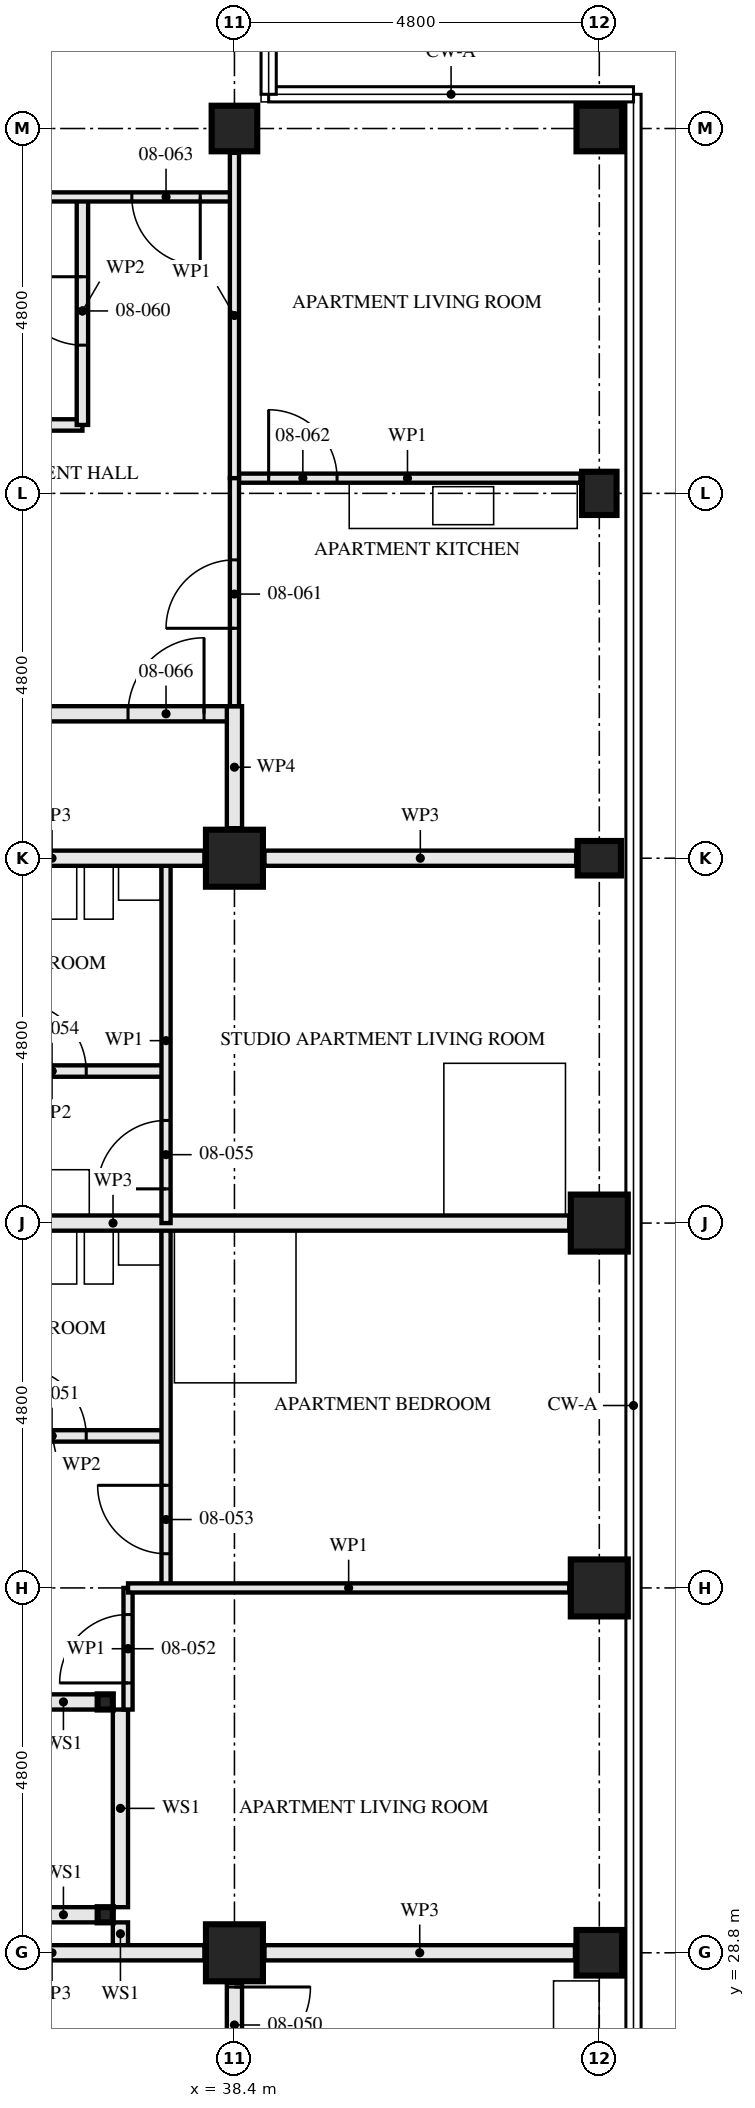
"""IFC4 building model, lengths in metres.
Left out: names, types, materials, properties, quantities, classifications, styles, units other than length and angle.
Written with IfcOpenShell. Run it as: python <this file> out.ifc"""

import sys

from ifc_helpers import new_model, si_unit, direction, frame, frame_2d, origin, origin_2d, place, context, subcontext, project, spatial, rectangle, hollow_rectangle, i_section, extrude, element, fill, save


model = new_model("IFC4")
c1 = context("Model", 3, precision=1e-05, world=origin(), true_north=direction((0.0, 1.0)))
c2 = subcontext(c1, "Body", "Model", "MODEL_VIEW")
j1 = project(units=[si_unit("LENGTHUNIT", "METRE"), si_unit("PLANEANGLEUNIT", "RADIAN")], contexts=[c1])
p1 = place(None, origin())
s1 = spatial("IfcSite", under=j1, at=p1, CompositionType="ELEMENT")
p2 = place(p1, origin())
s2 = spatial("IfcBuilding", under=s1, at=p2, CompositionType="ELEMENT")
p3 = place(p2, frame((0.0, 0.0, 34.0)))
s3 = spatial("IfcBuildingStorey", under=s2, at=p3, CompositionType="ELEMENT", Elevation=34.0)
for number, where, z_axis, x_axis in (
    (1, (38.4, 28.8, 0.0), (0.0, 0.0, 1.0), (0.0, 1.0, 0.0)),
    (2, (38.4, 43.2, 0.0), (0.0, 0.0, 1.0), (0.0, 1.0, 0.0)),
):
    element("IfcColumn", number, at=place(p3, frame(where, z_axis=z_axis, x_axis=x_axis)), inside=s3, PredefinedType="COLUMN", context=c2, shape_type="SweptSolid", body=[
        extrude(hollow_rectangle(XDim=0.75, YDim=0.75, WallThickness=0.08, at=origin_2d()), origin(), (0.0, 0.0, 1.0), 3.5),
    ])
p4 = place(p3, frame((38.4, 52.8, 0.0), z_axis=(0.0, 0.0, 1.0), x_axis=(0.0, 1.0, 0.0)))
e3 = element("IfcColumn", 3, at=p4, inside=s3, PredefinedType="COLUMN", context=c2, shape_type="SweptSolid", body=[
    extrude(hollow_rectangle(XDim=0.6, YDim=0.6, WallThickness=0.05, at=origin_2d()), origin(), (0.0, 0.0, 1.0), 3.5),
])
p5 = place(p3, frame((43.2, 28.8, 0.0), z_axis=(0.0, 0.0, 1.0), x_axis=(0.0, 1.0, 0.0)))
e4 = element("IfcColumn", 4, at=p5, inside=s3, PredefinedType="COLUMN", context=c2, shape_type="SweptSolid", body=[
    extrude(hollow_rectangle(XDim=0.6, YDim=0.6, WallThickness=0.08, at=origin_2d()), origin(), (0.0, 0.0, 1.0), 3.5),
])
for number, where, z_axis, x_axis in (
    (5, (43.2, 33.6, 0.0), (0.0, 0.0, 1.0), (1.0, 0.0, 0.0)),
    (6, (43.2, 38.4, 0.0), (0.0, 0.0, 1.0), (1.0, 0.0, 0.0)),
):
    element("IfcColumn", number, at=place(p3, frame(where, z_axis=z_axis, x_axis=x_axis)), inside=s3, PredefinedType="COLUMN", context=c2, shape_type="SweptSolid", body=[
        extrude(hollow_rectangle(XDim=0.75, YDim=0.75, WallThickness=0.08, at=origin_2d()), origin(), (0.0, 0.0, 1.0), 3.5),
    ])
for number, where, z_axis, x_axis in (
    (7, (43.2, 43.2, 0.0), (0.0, 0.0, 1.0), (0.0, 1.0, 0.0)),
    (8, (43.2, 48.0, 0.0), (0.0, 0.0, 1.0), (1.0, 0.0, 0.0)),
):
    element("IfcColumn", number, at=place(p3, frame(where, z_axis=z_axis, x_axis=x_axis)), inside=s3, PredefinedType="COLUMN", context=c2, shape_type="SweptSolid", body=[
        extrude(i_section(OverallWidth=0.454, OverallDepth=0.569, WebThickness=0.078, FlangeThickness=0.125, FilletRadius=0.015, at=origin_2d()), origin(), (0.0, 0.0, 1.0), 3.5),
    ])
p6 = place(p3, frame((43.2, 52.8, 0.0), z_axis=(0.0, 0.0, 1.0), x_axis=(0.0, 1.0, 0.0)))
e9 = element("IfcColumn", 9, at=p6, inside=s3, PredefinedType="COLUMN", context=c2, shape_type="SweptSolid", body=[
    extrude(hollow_rectangle(XDim=0.6, YDim=0.6, WallThickness=0.05, at=origin_2d()), origin(), (0.0, 0.0, 1.0), 3.5),
])
for number, where, z_axis, x_axis in (
    (10, (36.7, 29.3, 0.0), (0.0, 0.0, 1.0), (1.0, 0.0, 0.0)),
    (11, (36.7, 32.1, 0.0), (0.0, 0.0, 1.0), (1.0, 0.0, 0.0)),
):
    element("IfcColumn", number, at=place(p3, frame(where, z_axis=z_axis, x_axis=x_axis)), inside=s3, PredefinedType="COLUMN", context=c2, shape_type="SweptSolid", body=[
        extrude(hollow_rectangle(XDim=0.2, YDim=0.2, WallThickness=0.008, at=origin_2d()), origin(), (0.0, 0.0, 1.0), 3.33),
    ])
p7 = place(p3, frame((38.4, 26.8, 0.0), z_axis=(0.0, 0.0, 1.0), x_axis=(0.0, 1.0, 0.0)))
e12 = element("IfcWall", 12, at=p7, inside=s3, PredefinedType="PARTITIONING", context=c2, shape_type="SweptSolid", body=[
    extrude(rectangle(XDim=1.605, YDim=0.2, at=frame_2d((0.802, 0.0))), origin(), (0.0, 0.0, 1.0), 3.33),
])
p8 = place(p7, frame((0.55, 0.0, 0.0)))
e13 = element("IfcOpeningElement", 13, at=p8, cuts=e12, PredefinedType="OPENING", context=c2, shape_type="SweptSolid", body=[
    extrude(rectangle(XDim=1.0, YDim=2.1, at=frame_2d((0.5, 1.05))), frame((0.0, 0.111, 0.0), z_axis=(0.0, -1.0, 0.0), x_axis=(1.0, 0.0, 0.0)), (0.0, 0.0, 1.0), 0.221),
])
for number, where, z_axis, x_axis in (
    (14, (36.6, 29.3, 0.0), (0.0, 0.0, 1.0), (-1.0, 0.0, 0.0)),
    (15, (36.6, 32.1, 0.0), (0.0, 0.0, 1.0), (-1.0, 0.0, 0.0)),
):
    element("IfcWall", number, at=place(p3, frame(where, z_axis=z_axis, x_axis=x_axis)), inside=s3, PredefinedType="SOLIDWALL", context=c2, shape_type="SweptSolid", body=[
        extrude(rectangle(XDim=0.9, YDim=0.2, at=frame_2d((0.45, 0.0))), origin(), (0.0, 0.0, 1.0), 2.99),
    ])
p9 = place(p3, frame((36.9, 28.9, 0.0), z_axis=(0.0, 0.0, 1.0), x_axis=(0.0, 1.0, 0.0)))
e16 = element("IfcWall", 16, at=p9, inside=s3, PredefinedType="SOLIDWALL", context=c2, shape_type="SweptSolid", body=[
    extrude(rectangle(XDim=0.3, YDim=0.2, at=frame_2d((0.15, 0.0))), origin(), (0.0, 0.0, 1.0), 3.33),
])
p10 = place(p3, frame((36.9, 29.4, 0.0), z_axis=(0.0, 0.0, 1.0), x_axis=(0.0, 1.0, 0.0)))
e17 = element("IfcWall", 17, at=p10, inside=s3, PredefinedType="SOLIDWALL", context=c2, shape_type="SweptSolid", body=[
    extrude(rectangle(XDim=2.6, YDim=0.2, at=frame_2d((1.3, 0.0))), origin(), (0.0, 0.0, 1.0), 3.33),
])
p11 = place(p3, frame((37.5, 35.6, 0.0), z_axis=(0.0, 0.0, 1.0), x_axis=(-1.0, 0.0, 0.0)))
e18 = element("IfcWall", 18, at=p11, inside=s3, PredefinedType="PARTITIONING", context=c2, shape_type="SweptSolid", body=[
    extrude(rectangle(XDim=3.0, YDim=0.15, at=frame_2d((1.5, 0.0))), origin(), (0.0, 0.0, 1.0), 3.33),
])
p12 = place(p11, frame((1.05, 0.0, 0.0)))
e19 = element("IfcOpeningElement", 19, at=p12, cuts=e18, PredefinedType="OPENING", context=c2, shape_type="SweptSolid", body=[
    extrude(rectangle(XDim=0.9, YDim=2.1, at=frame_2d((0.45, 1.05))), frame((0.0, 0.085, 0.0), z_axis=(0.0, -1.0, 0.0), x_axis=(1.0, 0.0, 0.0)), (0.0, 0.0, 1.0), 0.171),
])
p13 = place(p3, frame((37.0, 32.0, 0.0), z_axis=(0.0, 0.0, 1.0), x_axis=(0.0, 1.0, 0.0)))
e20 = element("IfcWall", 20, at=p13, inside=s3, PredefinedType="PARTITIONING", context=c2, shape_type="SweptSolid", body=[
    extrude(rectangle(XDim=1.6, YDim=0.12, at=frame_2d((0.8, 0.0))), origin(), (0.0, 0.0, 1.0), 3.33),
])
p14 = place(p13, frame((0.35, 0.0, 0.0)))
e21 = element("IfcOpeningElement", 21, at=p14, cuts=e20, PredefinedType="OPENING", context=c2, shape_type="SweptSolid", body=[
    extrude(rectangle(XDim=0.9, YDim=2.1, at=frame_2d((0.45, 1.05))), frame((0.0, 0.071, 0.0), z_axis=(0.0, -1.0, 0.0), x_axis=(1.0, 0.0, 0.0)), (0.0, 0.0, 1.0), 0.141),
])
p15 = place(p3, frame((37.5, 33.6, 0.0), z_axis=(0.0, 0.0, 1.0), x_axis=(0.0, 1.0, 0.0)))
e22 = element("IfcWall", 22, at=p15, inside=s3, PredefinedType="PARTITIONING", context=c2, shape_type="SweptSolid", body=[
    extrude(rectangle(XDim=4.8, YDim=0.12, at=frame_2d((2.4, 0.0))), origin(), (0.0, 0.0, 1.0), 3.33),
])
p16 = place(p15, frame((0.45, 0.0, 0.0)))
e23 = element("IfcOpeningElement", 23, at=p16, cuts=e22, PredefinedType="OPENING", context=c2, shape_type="SweptSolid", body=[
    extrude(rectangle(XDim=0.9, YDim=2.1, at=frame_2d((0.45, 1.05))), frame((0.0, 0.071, 0.0), z_axis=(0.0, -1.0, 0.0), x_axis=(1.0, 0.0, 0.0)), (0.0, 0.0, 1.0), 0.141),
])
p17 = place(p3, frame((42.805, 33.6, 0.0), z_axis=(0.0, 0.0, 1.0), x_axis=(-1.0, 0.0, 0.0)))
e24 = element("IfcWall", 24, at=p17, inside=s3, PredefinedType="PARTITIONING", context=c2, shape_type="SweptSolid", body=[
    extrude(rectangle(XDim=5.805, YDim=0.12, at=frame_2d((2.902, 0.0))), origin(), (0.0, 0.0, 1.0), 2.55),
])
p18 = place(p3, frame((42.805, 38.4, 0.0), z_axis=(0.0, 0.0, 1.0), x_axis=(-1.0, 0.0, 0.0)))
e25 = element("IfcWall", 25, at=p18, inside=s3, PredefinedType="PARTITIONING", context=c2, shape_type="SweptSolid", body=[
    extrude(rectangle(XDim=12.005, YDim=0.2, at=frame_2d((6.002, 0.0))), origin(), (0.0, 0.0, 1.0), 2.55),
])
p19 = place(p3, frame((37.5, 40.4, 0.0), z_axis=(0.0, 0.0, 1.0), x_axis=(-1.0, 0.0, 0.0)))
e26 = element("IfcWall", 26, at=p19, inside=s3, PredefinedType="PARTITIONING", context=c2, shape_type="SweptSolid", body=[
    extrude(rectangle(XDim=3.0, YDim=0.15, at=frame_2d((1.5, 0.0))), origin(), (0.0, 0.0, 1.0), 3.33),
])
p20 = place(p19, frame((1.05, 0.0, 0.0)))
e27 = element("IfcOpeningElement", 27, at=p20, cuts=e26, PredefinedType="OPENING", context=c2, shape_type="SweptSolid", body=[
    extrude(rectangle(XDim=0.9, YDim=2.1, at=frame_2d((0.45, 1.05))), frame((0.0, 0.085, 0.0), z_axis=(0.0, -1.0, 0.0), x_axis=(1.0, 0.0, 0.0)), (0.0, 0.0, 1.0), 0.171),
])
p21 = place(p3, frame((37.5, 38.4, 0.0), z_axis=(0.0, 0.0, 1.0), x_axis=(0.0, 1.0, 0.0)))
e28 = element("IfcWall", 28, at=p21, inside=s3, PredefinedType="PARTITIONING", context=c2, shape_type="SweptSolid", body=[
    extrude(rectangle(XDim=4.8, YDim=0.12, at=frame_2d((2.4, 0.0))), origin(), (0.0, 0.0, 1.0), 3.33),
])
p22 = place(p21, frame((0.45, 0.0, 0.0)))
e29 = element("IfcOpeningElement", 29, at=p22, cuts=e28, PredefinedType="OPENING", context=c2, shape_type="SweptSolid", body=[
    extrude(rectangle(XDim=0.9, YDim=2.1, at=frame_2d((0.45, 1.05))), frame((0.0, 0.071, 0.0), z_axis=(0.0, -1.0, 0.0), x_axis=(1.0, 0.0, 0.0)), (0.0, 0.0, 1.0), 0.141),
])
p23 = place(p3, frame((36.4, 51.9, 0.0), z_axis=(0.0, 0.0, 1.0), x_axis=(0.0, -1.0, 0.0)))
e30 = element("IfcWall", 30, at=p23, inside=s3, PredefinedType="PARTITIONING", context=c2, shape_type="SweptSolid", body=[
    extrude(rectangle(XDim=3.0, YDim=0.15, at=frame_2d((1.5, 0.0))), origin(), (0.0, 0.0, 1.0), 3.33),
])
p24 = place(p23, frame((1.05, 0.0, 0.0)))
e31 = element("IfcOpeningElement", 31, at=p24, cuts=e30, PredefinedType="OPENING", context=c2, shape_type="SweptSolid", body=[
    extrude(rectangle(XDim=0.9, YDim=2.1, at=frame_2d((0.45, 1.05))), frame((0.0, 0.085, 0.0), z_axis=(0.0, -1.0, 0.0), x_axis=(1.0, 0.0, 0.0)), (0.0, 0.0, 1.0), 0.171),
])
p25 = place(p3, frame((36.4, 48.9, 0.0), z_axis=(0.0, 0.0, 1.0), x_axis=(-1.0, 0.0, 0.0)))
e32 = element("IfcWall", 32, at=p25, inside=s3, PredefinedType="PARTITIONING", context=c2, shape_type="SweptSolid", body=[
    extrude(rectangle(XDim=2.8, YDim=0.15, at=frame_2d((1.4, 0.0))), origin(), (0.0, 0.0, 1.0), 3.33),
])
p26 = place(p3, frame((38.4, 48.2, 0.0), z_axis=(0.0, 0.0, 1.0), x_axis=(0.0, -1.0, 0.0)))
e33 = element("IfcWall", 33, at=p26, inside=s3, PredefinedType="PARTITIONING", context=c2, shape_type="SweptSolid", body=[
    extrude(rectangle(XDim=3.0, YDim=0.12, at=frame_2d((1.5, 0.0))), origin(), (0.0, 0.0, 1.0), 2.55),
])
p27 = place(p26, frame((1.075, 0.0, 0.0)))
e34 = element("IfcOpeningElement", 34, at=p27, cuts=e33, PredefinedType="OPENING", context=c2, shape_type="SweptSolid", body=[
    extrude(rectangle(XDim=0.9, YDim=2.1, at=frame_2d((0.45, 1.05))), frame((0.0, 0.071, 0.0), z_axis=(0.0, -1.0, 0.0), x_axis=(1.0, 0.0, 0.0)), (0.0, 0.0, 1.0), 0.141),
])
p28 = place(p3, frame((42.953, 48.2, 0.0), z_axis=(0.0, 0.0, 1.0), x_axis=(-1.0, 0.0, 0.0)))
e35 = element("IfcWall", 35, at=p28, inside=s3, PredefinedType="PARTITIONING", context=c2, shape_type="SweptSolid", body=[
    extrude(rectangle(XDim=4.553, YDim=0.12, at=frame_2d((2.276, 0.0))), origin(), (0.0, 0.0, 1.0), 3.33),
])
p29 = place(p28, frame((3.203, 0.0, 0.0)))
e36 = element("IfcOpeningElement", 36, at=p29, cuts=e35, PredefinedType="OPENING", context=c2, shape_type="SweptSolid", body=[
    extrude(rectangle(XDim=0.9, YDim=2.1, at=frame_2d((0.45, 1.05))), frame((0.0, 0.071, 0.0), z_axis=(0.0, -1.0, 0.0), x_axis=(1.0, 0.0, 0.0)), (0.0, 0.0, 1.0), 0.141),
])
p30 = place(p3, frame((38.4, 51.9, 0.0), z_axis=(0.0, 0.0, 1.0), x_axis=(-1.0, 0.0, 0.0)))
e37 = element("IfcWall", 37, at=p30, inside=s3, PredefinedType="PARTITIONING", context=c2, shape_type="SweptSolid", body=[
    extrude(rectangle(XDim=4.8, YDim=0.12, at=frame_2d((2.4, 0.0))), origin(), (0.0, 0.0, 1.0), 3.33),
])
p31 = place(p30, frame((0.45, 0.0, 0.0)))
e38 = element("IfcOpeningElement", 38, at=p31, cuts=e37, PredefinedType="OPENING", context=c2, shape_type="SweptSolid", body=[
    extrude(rectangle(XDim=0.9, YDim=2.1, at=frame_2d((0.45, 1.05))), frame((0.0, 0.071, 0.0), z_axis=(0.0, -1.0, 0.0), x_axis=(1.0, 0.0, 0.0)), (0.0, 0.0, 1.0), 0.141),
])
p32 = place(p3, frame((38.4, 52.48, 0.0), z_axis=(0.0, 0.0, 1.0), x_axis=(0.0, -1.0, 0.0)))
e39 = element("IfcWall", 39, at=p32, inside=s3, PredefinedType="PARTITIONING", context=c2, shape_type="SweptSolid", body=[
    extrude(rectangle(XDim=4.28, YDim=0.12, at=frame_2d((2.14, 0.0))), origin(), (0.0, 0.0, 1.0), 3.33),
])
p33 = place(p3, frame((38.4, 45.1, 0.0), z_axis=(0.0, 0.0, 1.0), x_axis=(-1.0, 0.0, 0.0)))
e40 = element("IfcWall", 40, at=p33, inside=s3, PredefinedType="PARTITIONING", context=c2, shape_type="SweptSolid", body=[
    extrude(rectangle(XDim=9.6, YDim=0.2, at=frame_2d((4.8, 0.0))), origin(), (0.0, 0.0, 1.0), 3.33),
])
p34 = place(p33, frame((0.4, 0.0, 0.0)))
e41 = element("IfcOpeningElement", 41, at=p34, cuts=e40, PredefinedType="OPENING", context=c2, shape_type="SweptSolid", body=[
    extrude(rectangle(XDim=1.0, YDim=2.1, at=frame_2d((0.5, 1.05))), frame((0.0, 0.111, 0.0), z_axis=(0.0, -1.0, 0.0), x_axis=(1.0, 0.0, 0.0)), (0.0, 0.0, 1.0), 0.221),
])
p35 = place(p33, frame((5.2, 0.0, 0.0)))
e42 = element("IfcOpeningElement", 42, at=p35, cuts=e40, PredefinedType="OPENING", context=c2, shape_type="SweptSolid", body=[
    extrude(rectangle(XDim=1.0, YDim=2.1, at=frame_2d((0.5, 1.05))), frame((0.0, 0.111, 0.0), z_axis=(0.0, -1.0, 0.0), x_axis=(1.0, 0.0, 0.0)), (0.0, 0.0, 1.0), 0.221),
])
p36 = place(p3, frame((38.4, 45.2, 0.0), z_axis=(0.0, 0.0, 1.0), x_axis=(0.0, -1.0, 0.0)))
e43 = element("IfcWall", 43, at=p36, inside=s3, PredefinedType="PARTITIONING", context=c2, shape_type="SweptSolid", body=[
    extrude(rectangle(XDim=1.605, YDim=0.2, at=frame_2d((0.802, 0.0))), origin(), (0.0, 0.0, 1.0), 3.33),
])
p37 = place(p3, frame((42.88, 28.8, 0.0), z_axis=(0.0, 0.0, 1.0), x_axis=(-1.0, 0.0, 0.0)))
e44 = element("IfcWall", 44, at=p37, inside=s3, PredefinedType="PARTITIONING", context=c2, shape_type="SweptSolid", body=[
    extrude(rectangle(XDim=4.085, YDim=0.2, at=frame_2d((2.042, 0.0))), origin(), (0.0, 0.0, 1.0), 2.32),
])
p38 = place(p3, frame((38.005, 28.8, 0.0), z_axis=(0.0, 0.0, 1.0), x_axis=(-1.0, 0.0, 0.0)))
e45 = element("IfcWall", 45, at=p38, inside=s3, PredefinedType="PARTITIONING", context=c2, shape_type="SweptSolid", body=[
    extrude(rectangle(XDim=4.01, YDim=0.2, at=frame_2d((2.005, 0.0))), origin(), (0.0, 0.0, 1.0), 2.32),
])
p39 = place(p3, frame((42.896, 43.2, 0.0), z_axis=(0.0, 0.0, 1.0), x_axis=(-1.0, 0.0, 0.0)))
e46 = element("IfcWall", 46, at=p39, inside=s3, PredefinedType="PARTITIONING", context=c2, shape_type="SweptSolid", body=[
    extrude(rectangle(XDim=4.101, YDim=0.2, at=frame_2d((2.05, 0.0))), origin(), (0.0, 0.0, 1.0), 2.32),
])
p40 = place(p3, frame((38.005, 43.2, 0.0), z_axis=(0.0, 0.0, 1.0), x_axis=(-1.0, 0.0, 0.0)))
e47 = element("IfcWall", 47, at=p40, inside=s3, PredefinedType="PARTITIONING", context=c2, shape_type="SweptSolid", body=[
    extrude(rectangle(XDim=4.01, YDim=0.2, at=frame_2d((2.005, 0.0))), origin(), (0.0, 0.0, 1.0), 2.32),
])
p41 = place(p8, frame((1.0, 0.0, 0.0), z_axis=(0.0, 0.0, 1.0), x_axis=(-1.0, 0.0, 0.0)))
e48 = element("IfcDoor", 48, at=p41, inside=s3, OperationType="SINGLE_SWING_RIGHT", PredefinedType="DOOR", context=c2, shape_type="SweptSolid", body=[
    extrude(rectangle(XDim=1.0, YDim=2.1, at=frame_2d((0.5, 1.05))), frame((0.0, 0.027, 0.0), z_axis=(0.0, -1.0, 0.0), x_axis=(1.0, 0.0, 0.0)), (0.0, 0.0, 1.0), 0.054),
])
fill(e13, e48)
p42 = place(p12, frame((0.9, 0.0, 0.0), z_axis=(0.0, 0.0, 1.0), x_axis=(-1.0, 0.0, 0.0)))
e49 = element("IfcDoor", 49, at=p42, inside=s3, OperationType="SINGLE_SWING_RIGHT", PredefinedType="DOOR", context=c2, shape_type="SweptSolid", body=[
    extrude(rectangle(XDim=0.9, YDim=2.1, at=frame_2d((0.45, 1.05))), frame((0.0, 0.022, 0.0), z_axis=(0.0, -1.0, 0.0), x_axis=(1.0, 0.0, 0.0)), (0.0, 0.0, 1.0), 0.044),
])
fill(e19, e49)
p43 = place(p14, origin())
e50 = element("IfcDoor", 50, at=p43, inside=s3, OperationType="SINGLE_SWING_RIGHT", PredefinedType="DOOR", context=c2, shape_type="SweptSolid", body=[
    extrude(rectangle(XDim=0.9, YDim=2.1, at=frame_2d((0.45, 1.05))), frame((0.0, 0.022, 0.0), z_axis=(0.0, -1.0, 0.0), x_axis=(1.0, 0.0, 0.0)), (0.0, 0.0, 1.0), 0.044),
])
fill(e21, e50)
p44 = place(p16, origin())
e51 = element("IfcDoor", 51, at=p44, inside=s3, OperationType="SINGLE_SWING_LEFT", PredefinedType="DOOR", context=c2, shape_type="SweptSolid", body=[
    extrude(rectangle(XDim=0.9, YDim=2.1, at=frame_2d((0.45, 1.05))), frame((0.0, 0.022, 0.0), z_axis=(0.0, -1.0, 0.0), x_axis=(1.0, 0.0, 0.0)), (0.0, 0.0, 1.0), 0.044),
])
fill(e23, e51)
p45 = place(p20, frame((0.9, 0.0, 0.0), z_axis=(0.0, 0.0, 1.0), x_axis=(-1.0, 0.0, 0.0)))
e52 = element("IfcDoor", 52, at=p45, inside=s3, OperationType="SINGLE_SWING_RIGHT", PredefinedType="DOOR", context=c2, shape_type="SweptSolid", body=[
    extrude(rectangle(XDim=0.9, YDim=2.1, at=frame_2d((0.45, 1.05))), frame((0.0, 0.022, 0.0), z_axis=(0.0, -1.0, 0.0), x_axis=(1.0, 0.0, 0.0)), (0.0, 0.0, 1.0), 0.044),
])
fill(e27, e52)
p46 = place(p22, origin())
e53 = element("IfcDoor", 53, at=p46, inside=s3, OperationType="SINGLE_SWING_RIGHT", PredefinedType="DOOR", context=c2, shape_type="SweptSolid", body=[
    extrude(rectangle(XDim=0.9, YDim=2.1, at=frame_2d((0.45, 1.05))), frame((0.0, 0.022, 0.0), z_axis=(0.0, -1.0, 0.0), x_axis=(1.0, 0.0, 0.0)), (0.0, 0.0, 1.0), 0.044),
])
fill(e29, e53)
p47 = place(p24, frame((0.9, 0.0, 0.0), z_axis=(0.0, 0.0, 1.0), x_axis=(-1.0, 0.0, 0.0)))
e54 = element("IfcDoor", 54, at=p47, inside=s3, OperationType="SINGLE_SWING_LEFT", PredefinedType="DOOR", context=c2, shape_type="SweptSolid", body=[
    extrude(rectangle(XDim=0.9, YDim=2.1, at=frame_2d((0.45, 1.05))), frame((0.0, 0.022, 0.0), z_axis=(0.0, -1.0, 0.0), x_axis=(1.0, 0.0, 0.0)), (0.0, 0.0, 1.0), 0.044),
])
fill(e31, e54)
p48 = place(p27, frame((0.9, 0.0, 0.0), z_axis=(0.0, 0.0, 1.0), x_axis=(-1.0, 0.0, 0.0)))
e55 = element("IfcDoor", 55, at=p48, inside=s3, OperationType="SINGLE_SWING_RIGHT", PredefinedType="DOOR", context=c2, shape_type="SweptSolid", body=[
    extrude(rectangle(XDim=0.9, YDim=2.1, at=frame_2d((0.45, 1.05))), frame((0.0, 0.022, 0.0), z_axis=(0.0, -1.0, 0.0), x_axis=(1.0, 0.0, 0.0)), (0.0, 0.0, 1.0), 0.044),
])
fill(e34, e55)
p49 = place(p29, frame((0.9, 0.0, 0.0), z_axis=(0.0, 0.0, 1.0), x_axis=(-1.0, 0.0, 0.0)))
e56 = element("IfcDoor", 56, at=p49, inside=s3, OperationType="SINGLE_SWING_RIGHT", PredefinedType="DOOR", context=c2, shape_type="SweptSolid", body=[
    extrude(rectangle(XDim=0.9, YDim=2.1, at=frame_2d((0.45, 1.05))), frame((0.0, 0.022, 0.0), z_axis=(0.0, -1.0, 0.0), x_axis=(1.0, 0.0, 0.0)), (0.0, 0.0, 1.0), 0.044),
])
fill(e36, e56)
p50 = place(p31, origin())
e57 = element("IfcDoor", 57, at=p50, inside=s3, OperationType="SINGLE_SWING_RIGHT", PredefinedType="DOOR", context=c2, shape_type="SweptSolid", body=[
    extrude(rectangle(XDim=0.9, YDim=2.1, at=frame_2d((0.45, 1.05))), frame((0.0, 0.022, 0.0), z_axis=(0.0, -1.0, 0.0), x_axis=(1.0, 0.0, 0.0)), (0.0, 0.0, 1.0), 0.044),
])
fill(e38, e57)
p51 = place(p34, frame((1.0, 0.0, 0.0), z_axis=(0.0, 0.0, 1.0), x_axis=(-1.0, 0.0, 0.0)))
e58 = element("IfcDoor", 58, at=p51, inside=s3, OperationType="SINGLE_SWING_LEFT", PredefinedType="DOOR", context=c2, shape_type="SweptSolid", body=[
    extrude(rectangle(XDim=1.0, YDim=2.1, at=frame_2d((0.5, 1.05))), frame((0.0, 0.027, 0.0), z_axis=(0.0, -1.0, 0.0), x_axis=(1.0, 0.0, 0.0)), (0.0, 0.0, 1.0), 0.054),
])
fill(e41, e58)
save(model, sys.argv[1])
